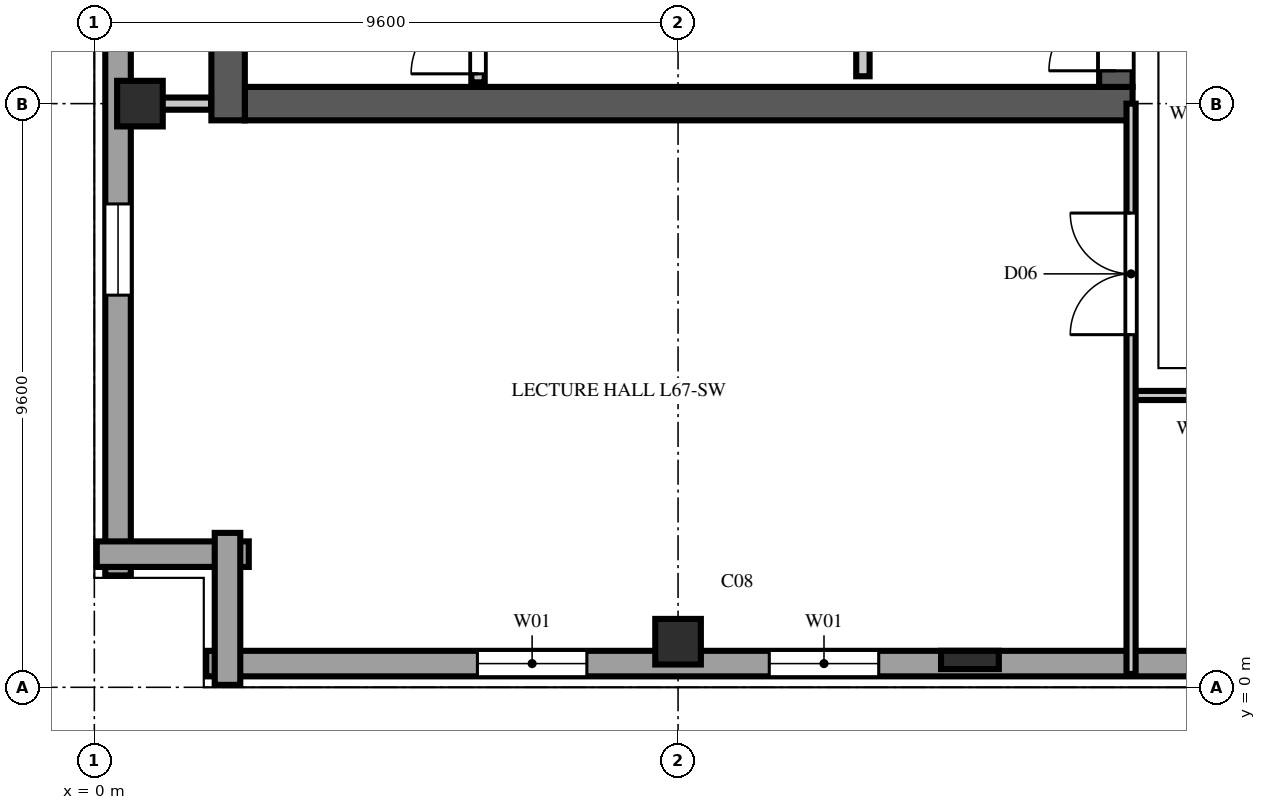
"""IFC4 building model, lengths in metres.
Left out: names, types, materials, properties, quantities, classifications, styles, units other than length and angle.
Written with IfcOpenShell. Run it as: python <this file> out.ifc"""

import sys

from ifc_helpers import new_model, si_unit, direction, frame, frame_2d, origin, origin_2d, place, context, subcontext, project, spatial, rectangle, extrude, element, fill, save


model = new_model("IFC4")
c1 = context("Model", 3, precision=1e-05, world=origin(), true_north=direction((0.0, 1.0)))
c2 = subcontext(c1, "Body", "Model", "MODEL_VIEW")
j1 = project(units=[si_unit("LENGTHUNIT", "METRE"), si_unit("PLANEANGLEUNIT", "RADIAN")], contexts=[c1])
p1 = place(None, origin())
s1 = spatial("IfcSite", under=j1, at=p1, CompositionType="ELEMENT")
p2 = place(p1, origin())
s2 = spatial("IfcBuilding", under=s1, at=p2, CompositionType="ELEMENT")
p3 = place(p2, frame((0.0, 0.0, 265.8)))
s3 = spatial("IfcBuildingStorey", under=s2, at=p3, CompositionType="ELEMENT", Elevation=265.8)
p4 = place(p3, frame((2.475, 9.6, 0.0), z_axis=(0.0, 0.0, 1.0), x_axis=(1.0, 0.0, 0.0)))
e1 = element("IfcWall", 1, at=p4, inside=s3, PredefinedType="SHEAR", context=c2, shape_type="SweptSolid", body=[
    extrude(rectangle(XDim=14.6, YDim=0.55, at=frame_2d((7.3, 0.0))), origin(), (0.0, 0.0, 1.0), 3.54),
])
p5 = place(p3, frame((2.2, 9.325, 0.0), z_axis=(0.0, 0.0, 1.0), x_axis=(0.0, 1.0, 0.0)))
e2 = element("IfcWall", 2, at=p5, inside=s3, PredefinedType="SHEAR", context=c2, shape_type="SweptSolid", body=[
    extrude(rectangle(XDim=38.95, YDim=0.55, at=frame_2d((19.475, 0.0))), origin(), (0.0, 0.0, 1.0), 3.54),
])
p6 = place(p3, frame((16.8, 9.875, 0.0), z_axis=(0.0, 0.0, 1.0), x_axis=(0.0, 1.0, 0.0)))
e3 = element("IfcWall", 3, at=p6, inside=s3, PredefinedType="SHEAR", context=c2, shape_type="SweptSolid", body=[
    extrude(rectangle(XDim=12.525, YDim=0.55, at=frame_2d((6.262, 0.0))), origin(), (0.0, 0.0, 1.0), 3.54),
])
p7 = place(p6, frame((0.265, 0.0, 0.0)))
e4 = element("IfcOpeningElement", 4, at=p7, cuts=e3, PredefinedType="OPENING", context=c2, shape_type="SweptSolid", body=[
    extrude(rectangle(XDim=1.1, YDim=2.2, at=frame_2d((0.55, 1.1))), frame((0.0, 0.287, 0.0), z_axis=(0.0, -1.0, 0.0), x_axis=(1.0, 0.0, 0.0)), (0.0, 0.0, 1.0), 0.574),
])
for number, where, z_axis, x_axis in (
    (5, (0.75, 9.6, 0.0), (0.0, 0.0, 1.0), (1.0, 0.0, 0.0)),
    (6, (9.6, 0.75, 0.0), (0.0, 0.0, 1.0), (1.0, 0.0, 0.0)),
):
    element("IfcColumn", number, at=place(p3, frame(where, z_axis=z_axis, x_axis=x_axis)), inside=s3, PredefinedType="COLUMN", context=c2, shape_type="SweptSolid", body=[
        extrude(rectangle(XDim=0.75, YDim=0.75, at=origin_2d()), origin(), (0.0, 0.0, 1.0), 3.8),
    ])
p8 = place(p3, frame((14.4, 0.45, 0.0), z_axis=(0.0, 0.0, 1.0), x_axis=(1.0, 0.0, 0.0)))
e7 = element("IfcColumn", 7, at=p8, inside=s3, PredefinedType="PILASTER", context=c2, shape_type="SweptSolid", body=[
    extrude(rectangle(XDim=0.95, YDim=0.3, at=origin_2d()), origin(), (0.0, 0.0, 1.0), 3.8),
])
p9 = place(p3, frame((1.84, 0.39, 0.0), z_axis=(0.0, 0.0, 1.0), x_axis=(1.0, 0.0, 0.0)))
e8 = element("IfcWall", 8, at=p9, inside=s3, PredefinedType="SOLIDWALL", context=c2, shape_type="SweptSolid", body=[
    extrude(rectangle(XDim=44.32, YDim=0.42, at=frame_2d((22.16, 0.0))), origin(), (0.0, 0.0, 1.0), 3.54),
])
p10 = place(p9, frame((4.46, 0.0, 0.85)))
e9 = element("IfcOpeningElement", 9, at=p10, cuts=e8, PredefinedType="OPENING", context=c2, shape_type="SweptSolid", body=[
    extrude(rectangle(XDim=1.8, YDim=1.85, at=frame_2d((0.9, 0.925))), frame((0.0, 0.222, 0.0), z_axis=(0.0, -1.0, 0.0), x_axis=(1.0, 0.0, 0.0)), (0.0, 0.0, 1.0), 0.444),
])
p11 = place(p9, frame((9.26, 0.0, 0.85)))
e10 = element("IfcOpeningElement", 10, at=p11, cuts=e8, PredefinedType="OPENING", context=c2, shape_type="SweptSolid", body=[
    extrude(rectangle(XDim=1.8, YDim=1.85, at=frame_2d((0.9, 0.925))), frame((0.0, 0.222, 0.0), z_axis=(0.0, -1.0, 0.0), x_axis=(1.0, 0.0, 0.0)), (0.0, 0.0, 1.0), 0.444),
])
p12 = place(p9, frame((18.86, 0.0, 0.85)))
e11 = element("IfcOpeningElement", 11, at=p12, cuts=e8, PredefinedType="OPENING", context=c2, shape_type="SweptSolid", body=[
    extrude(rectangle(XDim=1.8, YDim=1.85, at=frame_2d((0.9, 0.925))), frame((0.0, 0.222, 0.0), z_axis=(0.0, -1.0, 0.0), x_axis=(1.0, 0.0, 0.0)), (0.0, 0.0, 1.0), 0.444),
])
p13 = place(p9, frame((28.46, 0.0, 0.85)))
e12 = element("IfcOpeningElement", 12, at=p13, cuts=e8, PredefinedType="OPENING", context=c2, shape_type="SweptSolid", body=[
    extrude(rectangle(XDim=1.8, YDim=1.85, at=frame_2d((0.9, 0.925))), frame((0.0, 0.222, 0.0), z_axis=(0.0, -1.0, 0.0), x_axis=(1.0, 0.0, 0.0)), (0.0, 0.0, 1.0), 0.444),
])
p14 = place(p9, frame((33.26, 0.0, 0.85)))
e13 = element("IfcOpeningElement", 13, at=p14, cuts=e8, PredefinedType="OPENING", context=c2, shape_type="SweptSolid", body=[
    extrude(rectangle(XDim=1.8, YDim=1.85, at=frame_2d((0.9, 0.925))), frame((0.0, 0.222, 0.0), z_axis=(0.0, -1.0, 0.0), x_axis=(1.0, 0.0, 0.0)), (0.0, 0.0, 1.0), 0.444),
])
p15 = place(p9, frame((38.06, 0.0, 0.85)))
e14 = element("IfcOpeningElement", 14, at=p15, cuts=e8, PredefinedType="OPENING", context=c2, shape_type="SweptSolid", body=[
    extrude(rectangle(XDim=1.8, YDim=1.85, at=frame_2d((0.9, 0.925))), frame((0.0, 0.222, 0.0), z_axis=(0.0, -1.0, 0.0), x_axis=(1.0, 0.0, 0.0)), (0.0, 0.0, 1.0), 0.444),
])
p16 = place(p3, frame((0.39, 46.16, 0.0), z_axis=(0.0, 0.0, 1.0), x_axis=(0.0, -1.0, 0.0)))
e15 = element("IfcWall", 15, at=p16, inside=s3, PredefinedType="SOLIDWALL", context=c2, shape_type="SweptSolid", body=[
    extrude(rectangle(XDim=44.32, YDim=0.42, at=frame_2d((22.16, 0.0))), origin(), (0.0, 0.0, 1.0), 3.54),
])
p17 = place(p16, frame((4.885, 0.0, 0.9)))
e16 = element("IfcOpeningElement", 16, at=p17, cuts=e15, PredefinedType="OPENING", context=c2, shape_type="SweptSolid", body=[
    extrude(rectangle(XDim=0.95, YDim=1.85, at=frame_2d((0.475, 0.925))), frame((0.0, 0.222, 0.0), z_axis=(0.0, -1.0, 0.0), x_axis=(1.0, 0.0, 0.0)), (0.0, 0.0, 1.0), 0.444),
])
p18 = place(p16, frame((9.41, 0.0, 0.9)))
e17 = element("IfcOpeningElement", 17, at=p18, cuts=e15, PredefinedType="OPENING", context=c2, shape_type="SweptSolid", body=[
    extrude(rectangle(XDim=1.5, YDim=1.85, at=frame_2d((0.75, 0.925))), frame((0.0, 0.222, 0.0), z_axis=(0.0, -1.0, 0.0), x_axis=(1.0, 0.0, 0.0)), (0.0, 0.0, 1.0), 0.444),
])
p19 = place(p16, frame((14.485, 0.0, 0.9)))
e18 = element("IfcOpeningElement", 18, at=p19, cuts=e15, PredefinedType="OPENING", context=c2, shape_type="SweptSolid", body=[
    extrude(rectangle(XDim=0.95, YDim=1.85, at=frame_2d((0.475, 0.925))), frame((0.0, 0.222, 0.0), z_axis=(0.0, -1.0, 0.0), x_axis=(1.0, 0.0, 0.0)), (0.0, 0.0, 1.0), 0.444),
])
p20 = place(p16, frame((19.01, 0.0, 0.9)))
e19 = element("IfcOpeningElement", 19, at=p20, cuts=e15, PredefinedType="OPENING", context=c2, shape_type="SweptSolid", body=[
    extrude(rectangle(XDim=1.5, YDim=1.85, at=frame_2d((0.75, 0.925))), frame((0.0, 0.222, 0.0), z_axis=(0.0, -1.0, 0.0), x_axis=(1.0, 0.0, 0.0)), (0.0, 0.0, 1.0), 0.444),
])
p21 = place(p16, frame((24.085, 0.0, 0.9)))
e20 = element("IfcOpeningElement", 20, at=p21, cuts=e15, PredefinedType="OPENING", context=c2, shape_type="SweptSolid", body=[
    extrude(rectangle(XDim=0.95, YDim=1.85, at=frame_2d((0.475, 0.925))), frame((0.0, 0.222, 0.0), z_axis=(0.0, -1.0, 0.0), x_axis=(1.0, 0.0, 0.0)), (0.0, 0.0, 1.0), 0.444),
])
p22 = place(p16, frame((28.61, 0.0, 0.9)))
e21 = element("IfcOpeningElement", 21, at=p22, cuts=e15, PredefinedType="OPENING", context=c2, shape_type="SweptSolid", body=[
    extrude(rectangle(XDim=1.5, YDim=1.85, at=frame_2d((0.75, 0.925))), frame((0.0, 0.222, 0.0), z_axis=(0.0, -1.0, 0.0), x_axis=(1.0, 0.0, 0.0)), (0.0, 0.0, 1.0), 0.444),
])
p23 = place(p16, frame((33.685, 0.0, 0.9)))
e22 = element("IfcOpeningElement", 22, at=p23, cuts=e15, PredefinedType="OPENING", context=c2, shape_type="SweptSolid", body=[
    extrude(rectangle(XDim=0.95, YDim=1.85, at=frame_2d((0.475, 0.925))), frame((0.0, 0.222, 0.0), z_axis=(0.0, -1.0, 0.0), x_axis=(1.0, 0.0, 0.0)), (0.0, 0.0, 1.0), 0.444),
])
p24 = place(p16, frame((38.21, 0.0, 0.9)))
e23 = element("IfcOpeningElement", 23, at=p24, cuts=e15, PredefinedType="OPENING", context=c2, shape_type="SweptSolid", body=[
    extrude(rectangle(XDim=1.5, YDim=1.85, at=frame_2d((0.75, 0.925))), frame((0.0, 0.222, 0.0), z_axis=(0.0, -1.0, 0.0), x_axis=(1.0, 0.0, 0.0)), (0.0, 0.0, 1.0), 0.444),
])
for number, where, z_axis, x_axis in (
    (24, (0.04, 2.19, 0.0), (0.0, 0.0, 1.0), (1.0, 0.0, 0.0)),
    (25, (2.19, 2.54, 0.0), (0.0, 0.0, 1.0), (0.0, -1.0, 0.0)),
):
    element("IfcWall", number, at=place(p3, frame(where, z_axis=z_axis, x_axis=x_axis)), inside=s3, PredefinedType="SOLIDWALL", context=c2, shape_type="SweptSolid", body=[
        extrude(rectangle(XDim=2.5, YDim=0.42, at=frame_2d((1.25, 0.0))), origin(), (0.0, 0.0, 1.0), 3.54),
    ])
p25 = place(p3, frame((6.31, 9.95, 0.0), z_axis=(0.0, 0.0, 1.0), x_axis=(0.0, 1.0, 0.0)))
e26 = element("IfcWall", 26, at=p25, inside=s3, PredefinedType="SOLIDWALL", context=c2, shape_type="SweptSolid", body=[
    extrude(rectangle(XDim=7.81, YDim=0.22, at=frame_2d((3.905, 0.0))), origin(), (0.0, 0.0, 1.0), 3.54),
])
p26 = place(p25, frame((0.14, 0.0, 0.0)))
e27 = element("IfcOpeningElement", 27, at=p26, cuts=e26, PredefinedType="OPENING", context=c2, shape_type="SweptSolid", body=[
    extrude(rectangle(XDim=1.1, YDim=2.2, at=frame_2d((0.55, 1.1))), frame((0.0, 0.122, 0.0), z_axis=(0.0, -1.0, 0.0), x_axis=(1.0, 0.0, 0.0)), (0.0, 0.0, 1.0), 0.244),
])
p27 = place(p3, frame((12.64, 10.05, 0.0), z_axis=(0.0, 0.0, 1.0), x_axis=(0.0, 1.0, 0.0)))
e28 = element("IfcWall", 28, at=p27, inside=s3, PredefinedType="SOLIDWALL", context=c2, shape_type="SweptSolid", body=[
    extrude(rectangle(XDim=7.71, YDim=0.22, at=frame_2d((3.855, 0.0))), origin(), (0.0, 0.0, 1.0), 3.54),
])
p28 = place(p3, frame((0.85, 9.6, 0.0), z_axis=(0.0, 0.0, 1.0), x_axis=(1.0, 0.0, 0.0)))
e29 = element("IfcWall", 29, at=p28, inside=s3, PredefinedType="SOLIDWALL", context=c2, shape_type="SweptSolid", body=[
    extrude(rectangle(XDim=1.07, YDim=0.2, at=frame_2d((0.535, 0.0))), origin(), (0.0, 0.0, 1.0), 3.123),
])
p29 = place(p3, frame((17.05, 4.8, 0.0), z_axis=(0.0, 0.0, 1.0), x_axis=(1.0, 0.0, 0.0)))
e30 = element("IfcWall", 30, at=p29, inside=s3, PredefinedType="PARTITIONING", context=c2, shape_type="SweptSolid", body=[
    extrude(rectangle(XDim=2.15, YDim=0.15, at=frame_2d((1.075, 0.0))), origin(), (0.0, 0.0, 1.0), 3.54),
])
p30 = place(p3, frame((17.05, 0.22, 0.0), z_axis=(0.0, 0.0, 1.0), x_axis=(0.0, 1.0, 0.0)))
e31 = element("IfcWall", 31, at=p30, inside=s3, PredefinedType="PARTITIONING", context=c2, shape_type="SweptSolid", body=[
    extrude(rectangle(XDim=9.38, YDim=0.15, at=frame_2d((4.69, 0.0))), origin(), (0.0, 0.0, 1.0), 3.54),
])
p31 = place(p30, frame((5.58, 0.0, 0.0)))
e32 = element("IfcOpeningElement", 32, at=p31, cuts=e31, PredefinedType="OPENING", context=c2, shape_type="SweptSolid", body=[
    extrude(rectangle(XDim=2.0, YDim=2.3, at=frame_2d((1.0, 1.15))), frame((0.0, 0.087, 0.0), z_axis=(0.0, -1.0, 0.0), x_axis=(1.0, 0.0, 0.0)), (0.0, 0.0, 1.0), 0.174),
])
p32 = place(p10, origin())
e33 = element("IfcWindow", 33, at=p32, inside=s3, PartitioningType="DOUBLE_PANEL_VERTICAL", PredefinedType="WINDOW", context=c2, shape_type="SweptSolid", body=[
    extrude(rectangle(XDim=1.8, YDim=1.85, at=frame_2d((0.9, 0.925))), frame((0.0, 0.11, 0.0), z_axis=(0.0, -1.0, 0.0), x_axis=(1.0, 0.0, 0.0)), (0.0, 0.0, 1.0), 0.06),
])
fill(e9, e33)
p33 = place(p11, origin())
e34 = element("IfcWindow", 34, at=p33, inside=s3, PartitioningType="DOUBLE_PANEL_VERTICAL", PredefinedType="WINDOW", context=c2, shape_type="SweptSolid", body=[
    extrude(rectangle(XDim=1.8, YDim=1.85, at=frame_2d((0.9, 0.925))), frame((0.0, 0.11, 0.0), z_axis=(0.0, -1.0, 0.0), x_axis=(1.0, 0.0, 0.0)), (0.0, 0.0, 1.0), 0.06),
])
fill(e10, e34)
p34 = place(p24, origin())
e35 = element("IfcWindow", 35, at=p34, inside=s3, PartitioningType="DOUBLE_PANEL_VERTICAL", PredefinedType="WINDOW", context=c2, shape_type="SweptSolid", body=[
    extrude(rectangle(XDim=1.5, YDim=1.85, at=frame_2d((0.75, 0.925))), frame((0.0, 0.11, 0.0), z_axis=(0.0, -1.0, 0.0), x_axis=(1.0, 0.0, 0.0)), (0.0, 0.0, 1.0), 0.06),
])
fill(e23, e35)
p35 = place(p26, origin())
e36 = element("IfcDoor", 36, at=p35, inside=s3, OperationType="SINGLE_SWING_LEFT", PredefinedType="DOOR", context=c2, shape_type="SweptSolid", body=[
    extrude(rectangle(XDim=1.1, YDim=2.2, at=frame_2d((0.55, 1.1))), frame((0.0, 0.025, 0.0), z_axis=(0.0, -1.0, 0.0), x_axis=(1.0, 0.0, 0.0)), (0.0, 0.0, 1.0), 0.05),
])
fill(e27, e36)
p36 = place(p7, origin())
e37 = element("IfcDoor", 37, at=p36, inside=s3, OperationType="SINGLE_SWING_LEFT", PredefinedType="DOOR", context=c2, shape_type="SweptSolid", body=[
    extrude(rectangle(XDim=1.1, YDim=2.2, at=frame_2d((0.55, 1.1))), frame((0.0, 0.025, 0.0), z_axis=(0.0, -1.0, 0.0), x_axis=(1.0, 0.0, 0.0)), (0.0, 0.0, 1.0), 0.05),
])
fill(e4, e37)
p37 = place(p31, origin())
e38 = element("IfcDoor", 38, at=p37, inside=s3, OperationType="DOUBLE_SWING_LEFT", PredefinedType="DOOR", context=c2, shape_type="SweptSolid", body=[
    extrude(rectangle(XDim=2.0, YDim=2.3, at=frame_2d((1.0, 1.15))), frame((0.0, 0.025, 0.0), z_axis=(0.0, -1.0, 0.0), x_axis=(1.0, 0.0, 0.0)), (0.0, 0.0, 1.0), 0.05),
])
fill(e32, e38)
save(model, sys.argv[1])
